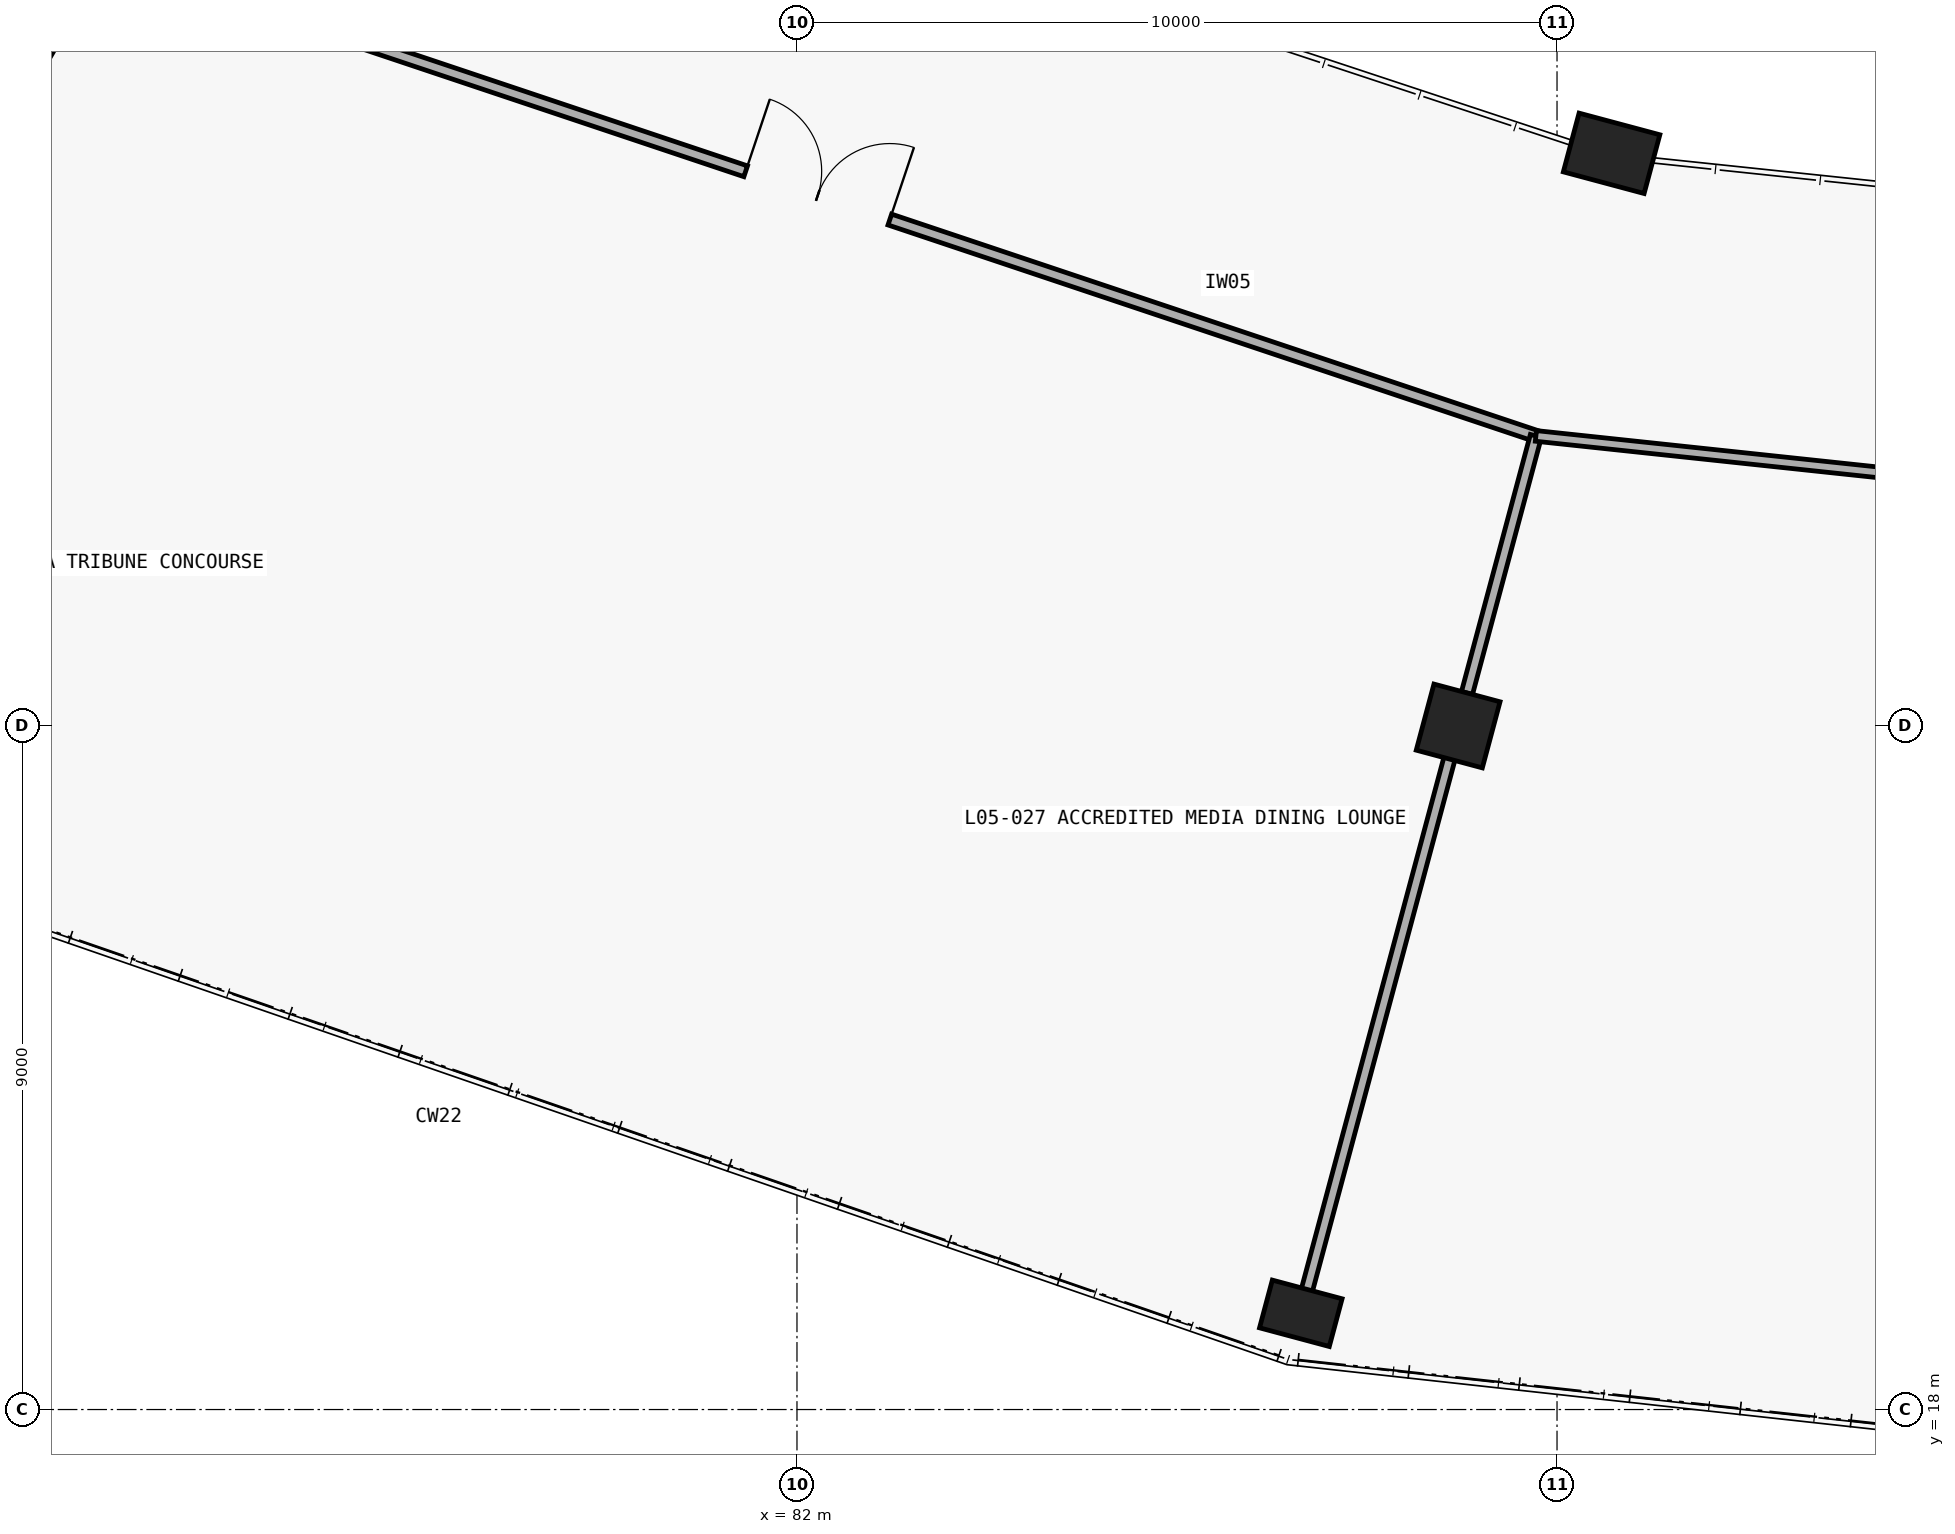
"""IFC4 building model, lengths in metres.
Left out: names, types, materials, properties, quantities, classifications, styles, units other than length and angle.
Written with IfcOpenShell. Run it as: python <this file> out.ifc"""

import sys

from ifc_helpers import new_model, si_unit, direction, frame, frame_2d, origin, origin_2d, place, context, subcontext, project, spatial, rectangle, extrude, element, fill, save


model = new_model("IFC4")
c1 = context("Model", 3, precision=1e-05, world=origin(), true_north=direction((0.0, 1.0)))
c2 = subcontext(c1, "Body", "Model", "MODEL_VIEW")
j1 = project(units=[si_unit("LENGTHUNIT", "METRE"), si_unit("PLANEANGLEUNIT", "RADIAN")], contexts=[c1])
p1 = place(None, origin())
s1 = spatial("IfcSite", under=j1, at=p1, CompositionType="ELEMENT")
p2 = place(p1, origin())
s2 = spatial("IfcBuilding", under=s1, at=p2, CompositionType="ELEMENT")
p3 = place(p2, frame((0.0, 0.0, 24.6)))
s3 = spatial("IfcBuildingStorey", under=s2, at=p3, CompositionType="ELEMENT", Elevation=24.6)
p4 = place(p3, frame((92.718, 34.527, 0.0), z_axis=(0.0, 0.0, 1.0), x_axis=(0.258819045103, 0.965925826289, 0.0)))
e1 = element("IfcColumn", 1, at=p4, inside=s3, PredefinedType="COLUMN", context=c2, shape_type="SweptSolid", body=[
    extrude(rectangle(XDim=0.8, YDim=1.1, at=origin_2d()), origin(), (0.0, 0.0, 1.0), 4.8),
])
p5 = place(p3, frame((88.629, 19.266, 0.0), z_axis=(0.0, 0.0, 1.0), x_axis=(0.258819045103, 0.965925826289, 0.0)))
e2 = element("IfcColumn", 2, at=p5, inside=s3, PredefinedType="COLUMN", context=c2, shape_type="SweptSolid", body=[
    extrude(rectangle(XDim=0.65, YDim=0.95, at=origin_2d()), origin(), (0.0, 0.0, 1.0), 4.8),
])
p6 = place(p3, frame((90.699, 26.993, 0.0), z_axis=(0.0, 0.0, 1.0), x_axis=(0.258819045103, 0.965925826289, 0.0)))
e3 = element("IfcColumn", 3, at=p6, inside=s3, PredefinedType="COLUMN", context=c2, shape_type="SweptSolid", body=[
    extrude(rectangle(XDim=0.9, YDim=0.9, at=origin_2d()), origin(), (0.0, 0.0, 1.0), 4.8),
])
p7 = place(p3, frame((74.75, 40.471, 0.0), z_axis=(0.0, 0.0, 1.0), x_axis=(-0.500009360108, -0.866019999656, 0.0)))
e4 = element("IfcWall", 4, at=p7, inside=s3, PredefinedType="PARAPET", context=c2, shape_type="SweptSolid", body=[
    extrude(rectangle(XDim=16.5, YDim=0.22, at=frame_2d((8.25, 0.0))), origin(), (0.0, 0.0, 1.0), 3.89),
])
p8 = place(p3, frame((72.825, 37.137, 0.0), z_axis=(0.0, 0.0, 1.0), x_axis=(0.948247492377, -0.317532192384, 0.0)))
e5 = element("IfcWall", 5, at=p8, inside=s3, PredefinedType="PARTITIONING", context=c2, shape_type="SweptSolid", body=[
    extrude(rectangle(XDim=19.928, YDim=0.15, at=frame_2d((9.964, 0.0))), origin(), (0.0, 0.0, 1.0), 3.84),
])
p9 = place(p8, frame((8.964, 0.0, 0.0)))
e6 = element("IfcOpeningElement", 6, at=p9, cuts=e5, PredefinedType="OPENING", context=c2, shape_type="SweptSolid", body=[
    extrude(rectangle(XDim=2.0, YDim=2.3, at=frame_2d((1.0, 1.15))), frame((0.0, 0.085, 0.0), z_axis=(0.0, -1.0, 0.0), x_axis=(1.0, 0.0, 0.0)), (0.0, 0.0, 1.0), 0.17),
])
p10 = place(p3, frame((91.722, 30.809, 0.0), z_axis=(0.0, 0.0, 1.0), x_axis=(-0.258807819197, -0.965928834191, 0.0)))
e7 = element("IfcWall", 7, at=p10, inside=s3, PredefinedType="PARTITIONING", context=c2, shape_type="SweptSolid", body=[
    extrude(rectangle(XDim=3.516, YDim=0.15, at=frame_2d((1.758, 0.0))), origin(), (0.0, 0.0, 1.0), 3.84),
])
p11 = place(p3, frame((90.816, 27.427, 0.0), z_axis=(0.0, 0.0, 1.0), x_axis=(-0.258995474122, -0.965878535006, 0.0)))
e8 = element("IfcWall", 8, at=p11, inside=s3, PredefinedType="PARTITIONING", context=c2, shape_type="SweptSolid", body=[
    extrude(rectangle(XDim=8.139, YDim=0.15, at=frame_2d((4.069, 0.0))), origin(), (0.0, 0.0, 1.0), 3.84),
])
p12 = place(p3, frame((91.722, 30.809, 0.0), z_axis=(0.0, 0.0, 1.0), x_axis=(0.994378914246, -0.105880002379, 0.0)))
e9 = element("IfcWall", 9, at=p12, inside=s3, PredefinedType="PARTITIONING", context=c2, shape_type="SweptSolid", body=[
    extrude(rectangle(XDim=20.393, YDim=0.14, at=frame_2d((10.196, 0.0))), origin(), (0.0, 0.0, 1.0), 3.84),
])
p13 = place(p12, frame((9.146, 0.0, 0.0)))
e10 = element("IfcOpeningElement", 10, at=p13, cuts=e9, PredefinedType="OPENING", context=c2, shape_type="SweptSolid", body=[
    extrude(rectangle(XDim=2.1, YDim=2.35, at=frame_2d((1.05, 1.175))), frame((0.0, 0.08, 0.0), z_axis=(0.0, -1.0, 0.0), x_axis=(1.0, 0.0, 0.0)), (0.0, 0.0, 1.0), 0.16),
])
p14 = place(p9, origin())
e11 = element("IfcDoor", 11, at=p14, inside=s3, OperationType="DOUBLE_DOOR_SINGLE_SWING", PredefinedType="DOOR", context=c2, shape_type="SweptSolid", body=[
    extrude(rectangle(XDim=2.0, YDim=2.3, at=frame_2d((1.0, 1.15))), frame((0.0, 0.025, 0.0), z_axis=(0.0, -1.0, 0.0), x_axis=(1.0, 0.0, 0.0)), (0.0, 0.0, 1.0), 0.05),
])
fill(e6, e11)
save(model, sys.argv[1])
